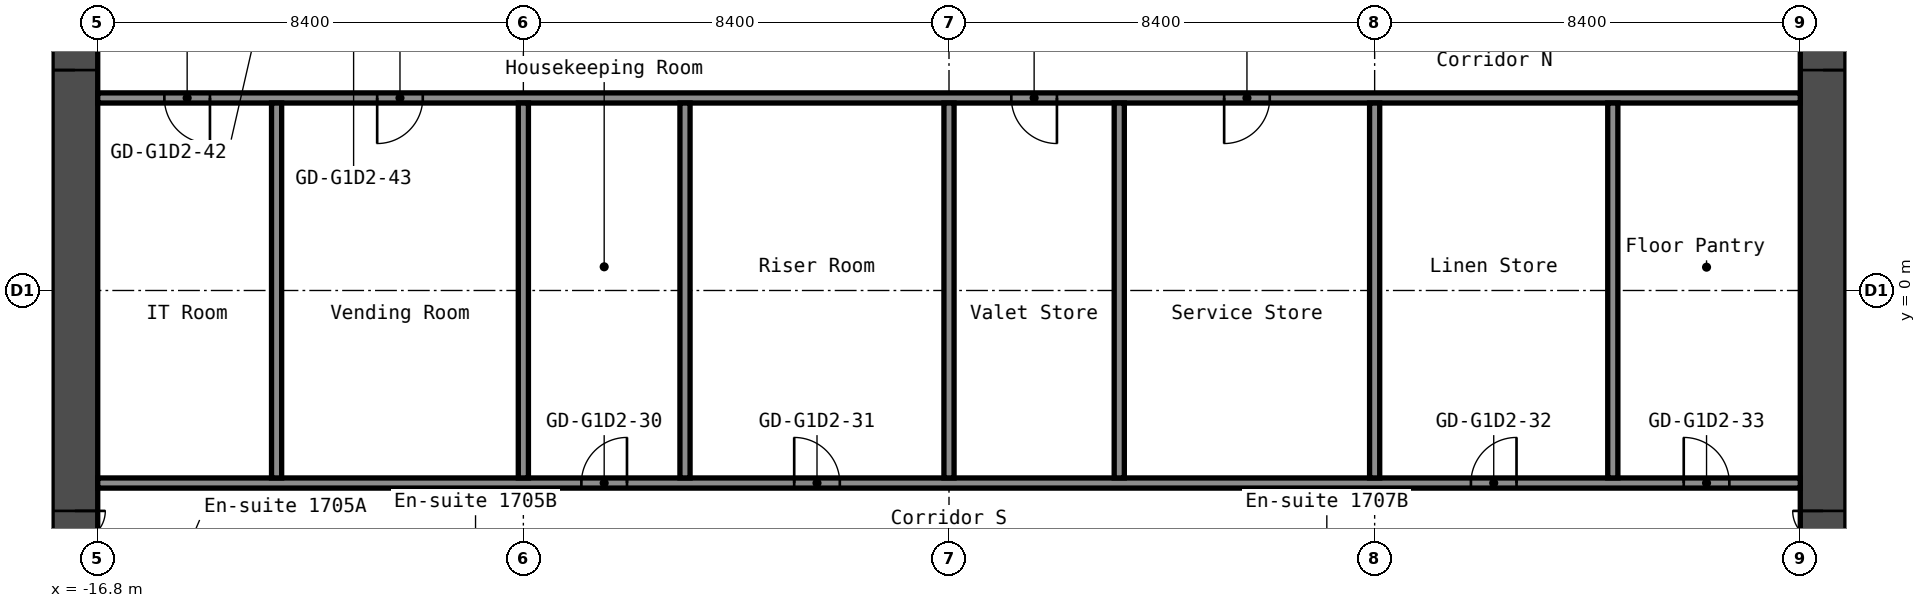
"""IFC4 building model, lengths in metres.
Left out: names, types, materials, properties, quantities, classifications, styles, units other than length and angle.
Written with IfcOpenShell. Run it as: python <this file> out.ifc"""

import sys

from ifc_helpers import new_model, si_unit, direction, frame, frame_2d, origin, place, context, subcontext, project, spatial, rectangle, extrude, element, fill, save


model = new_model("IFC4")
c1 = context("Model", 3, precision=1e-05, world=origin(), true_north=direction((0.0, 1.0)))
c2 = subcontext(c1, "Body", "Model", "MODEL_VIEW")
j1 = project(units=[si_unit("LENGTHUNIT", "METRE"), si_unit("PLANEANGLEUNIT", "RADIAN")], contexts=[c1])
p1 = place(None, origin())
s1 = spatial("IfcSite", under=j1, at=p1, CompositionType="ELEMENT")
p2 = place(p1, origin())
s2 = spatial("IfcBuilding", under=s1, at=p2, CompositionType="ELEMENT")
p3 = place(p2, frame((0.0, 0.0, 61.4)))
s3 = spatial("IfcBuildingStorey", under=s2, at=p3, CompositionType="ELEMENT", Elevation=61.4)
p4 = place(p3, frame((-17.25, -8.4, 0.0), z_axis=(0.0, 0.0, 1.0), x_axis=(0.0, 1.0, 0.0)))
e1 = element("IfcWall", 1, at=p4, inside=s3, PredefinedType="SHEAR", context=c2, shape_type="SweptSolid", body=[
    extrude(rectangle(XDim=16.8, YDim=0.9, at=frame_2d((8.4, 0.0))), origin(), (0.0, 0.0, 1.0), 2.9),
])
p5 = place(p4, frame((12.75, 0.0, 0.0)))
e2 = element("IfcOpeningElement", 2, at=p5, cuts=e1, PredefinedType="OPENING", context=c2, shape_type="SweptSolid", body=[
    extrude(rectangle(XDim=1.2, YDim=2.1, at=frame_2d((0.6, 1.05))), frame((0.0, 0.46, 0.0), z_axis=(0.0, -1.0, 0.0), x_axis=(1.0, 0.0, 0.0)), (0.0, 0.0, 1.0), 0.92),
])
p6 = place(p4, frame((2.85, 0.0, 0.0)))
e3 = element("IfcOpeningElement", 3, at=p6, cuts=e1, PredefinedType="OPENING", context=c2, shape_type="SweptSolid", body=[
    extrude(rectangle(XDim=1.2, YDim=2.1, at=frame_2d((0.6, 1.05))), frame((0.0, 0.46, 0.0), z_axis=(0.0, -1.0, 0.0), x_axis=(1.0, 0.0, 0.0)), (0.0, 0.0, 1.0), 0.92),
])
p7 = place(p3, frame((17.25, -8.4, 0.0), z_axis=(0.0, 0.0, 1.0), x_axis=(0.0, 1.0, 0.0)))
e4 = element("IfcWall", 4, at=p7, inside=s3, PredefinedType="SHEAR", context=c2, shape_type="SweptSolid", body=[
    extrude(rectangle(XDim=16.8, YDim=0.9, at=frame_2d((8.4, 0.0))), origin(), (0.0, 0.0, 1.0), 2.9),
])
p8 = place(p7, frame((12.75, 0.0, 0.0)))
e5 = element("IfcOpeningElement", 5, at=p8, cuts=e4, PredefinedType="OPENING", context=c2, shape_type="SweptSolid", body=[
    extrude(rectangle(XDim=1.2, YDim=2.1, at=frame_2d((0.6, 1.05))), frame((0.0, 0.46, 0.0), z_axis=(0.0, -1.0, 0.0), x_axis=(1.0, 0.0, 0.0)), (0.0, 0.0, 1.0), 0.92),
])
p9 = place(p7, frame((2.85, 0.0, 0.0)))
e6 = element("IfcOpeningElement", 6, at=p9, cuts=e4, PredefinedType="OPENING", context=c2, shape_type="SweptSolid", body=[
    extrude(rectangle(XDim=1.2, YDim=2.1, at=frame_2d((0.6, 1.05))), frame((0.0, 0.46, 0.0), z_axis=(0.0, -1.0, 0.0), x_axis=(1.0, 0.0, 0.0)), (0.0, 0.0, 1.0), 0.92),
])
p10 = place(p3, frame((-16.8, -3.8, 0.0), z_axis=(0.0, 0.0, 1.0), x_axis=(1.0, 0.0, 0.0)))
e7 = element("IfcWall", 7, at=p10, inside=s3, PredefinedType="PARTITIONING", context=c2, shape_type="SweptSolid", body=[
    extrude(rectangle(XDim=33.6, YDim=0.2, at=frame_2d((16.8, 0.0))), origin(), (0.0, 0.0, 1.0), 2.9),
])
p11 = place(p10, frame((9.545, 0.0, 0.0)))
e8 = element("IfcOpeningElement", 8, at=p11, cuts=e7, PredefinedType="OPENING", context=c2, shape_type="SweptSolid", body=[
    extrude(rectangle(XDim=0.9, YDim=2.1, at=frame_2d((0.45, 1.05))), frame((0.0, 0.11, 0.0), z_axis=(0.0, -1.0, 0.0), x_axis=(1.0, 0.0, 0.0)), (0.0, 0.0, 1.0), 0.22),
])
p12 = place(p10, frame((13.745, 0.0, 0.0)))
e9 = element("IfcOpeningElement", 9, at=p12, cuts=e7, PredefinedType="OPENING", context=c2, shape_type="SweptSolid", body=[
    extrude(rectangle(XDim=0.9, YDim=2.1, at=frame_2d((0.45, 1.05))), frame((0.0, 0.11, 0.0), z_axis=(0.0, -1.0, 0.0), x_axis=(1.0, 0.0, 0.0)), (0.0, 0.0, 1.0), 0.22),
])
p13 = place(p10, frame((27.1, 0.0, 0.0)))
e10 = element("IfcOpeningElement", 10, at=p13, cuts=e7, PredefinedType="OPENING", context=c2, shape_type="SweptSolid", body=[
    extrude(rectangle(XDim=0.9, YDim=2.1, at=frame_2d((0.45, 1.05))), frame((0.0, 0.11, 0.0), z_axis=(0.0, -1.0, 0.0), x_axis=(1.0, 0.0, 0.0)), (0.0, 0.0, 1.0), 0.22),
])
p14 = place(p10, frame((31.3, 0.0, 0.0)))
e11 = element("IfcOpeningElement", 11, at=p14, cuts=e7, PredefinedType="OPENING", context=c2, shape_type="SweptSolid", body=[
    extrude(rectangle(XDim=0.9, YDim=2.1, at=frame_2d((0.45, 1.05))), frame((0.0, 0.11, 0.0), z_axis=(0.0, -1.0, 0.0), x_axis=(1.0, 0.0, 0.0)), (0.0, 0.0, 1.0), 0.22),
])
p15 = place(p3, frame((-16.8, 3.8, 0.0), z_axis=(0.0, 0.0, 1.0), x_axis=(1.0, 0.0, 0.0)))
e12 = element("IfcWall", 12, at=p15, inside=s3, PredefinedType="PARTITIONING", context=c2, shape_type="SweptSolid", body=[
    extrude(rectangle(XDim=33.6, YDim=0.2, at=frame_2d((16.8, 0.0))), origin(), (0.0, 0.0, 1.0), 2.9),
])
p16 = place(p15, frame((1.315, 0.0, 0.0)))
e13 = element("IfcOpeningElement", 13, at=p16, cuts=e12, PredefinedType="OPENING", context=c2, shape_type="SweptSolid", body=[
    extrude(rectangle(XDim=0.9, YDim=2.1, at=frame_2d((0.45, 1.05))), frame((0.0, 0.11, 0.0), z_axis=(0.0, -1.0, 0.0), x_axis=(1.0, 0.0, 0.0)), (0.0, 0.0, 1.0), 0.22),
])
p17 = place(p15, frame((5.515, 0.0, 0.0)))
e14 = element("IfcOpeningElement", 14, at=p17, cuts=e12, PredefinedType="OPENING", context=c2, shape_type="SweptSolid", body=[
    extrude(rectangle(XDim=0.9, YDim=2.1, at=frame_2d((0.45, 1.05))), frame((0.0, 0.11, 0.0), z_axis=(0.0, -1.0, 0.0), x_axis=(1.0, 0.0, 0.0)), (0.0, 0.0, 1.0), 0.22),
])
p18 = place(p15, frame((18.03, 0.0, 0.0)))
e15 = element("IfcOpeningElement", 15, at=p18, cuts=e12, PredefinedType="OPENING", context=c2, shape_type="SweptSolid", body=[
    extrude(rectangle(XDim=0.9, YDim=2.1, at=frame_2d((0.45, 1.05))), frame((0.0, 0.11, 0.0), z_axis=(0.0, -1.0, 0.0), x_axis=(1.0, 0.0, 0.0)), (0.0, 0.0, 1.0), 0.22),
])
p19 = place(p15, frame((22.23, 0.0, 0.0)))
e16 = element("IfcOpeningElement", 16, at=p19, cuts=e12, PredefinedType="OPENING", context=c2, shape_type="SweptSolid", body=[
    extrude(rectangle(XDim=0.9, YDim=2.1, at=frame_2d((0.45, 1.05))), frame((0.0, 0.11, 0.0), z_axis=(0.0, -1.0, 0.0), x_axis=(1.0, 0.0, 0.0)), (0.0, 0.0, 1.0), 0.22),
])
for number, where, z_axis, x_axis in (
    (17, (-13.27, -3.7, 0.0), (0.0, 0.0, 1.0), (0.0, 1.0, 0.0)),
    (18, (-8.4, -3.7, 0.0), (0.0, 0.0, 1.0), (0.0, 1.0, 0.0)),
    (19, (-5.21, -3.7, 0.0), (0.0, 0.0, 1.0), (0.0, 1.0, 0.0)),
    (20, (0.0, -3.7, 0.0), (0.0, 0.0, 1.0), (0.0, 1.0, 0.0)),
    (21, (3.36, -3.7, 0.0), (0.0, 0.0, 1.0), (0.0, 1.0, 0.0)),
    (22, (8.4, -3.7, 0.0), (0.0, 0.0, 1.0), (0.0, 1.0, 0.0)),
    (23, (13.1, -3.7, 0.0), (0.0, 0.0, 1.0), (0.0, 1.0, 0.0)),
):
    element("IfcWall", number, at=place(p3, frame(where, z_axis=z_axis, x_axis=x_axis)), inside=s3, PredefinedType="PARTITIONING", context=c2, shape_type="SweptSolid", body=[
        extrude(rectangle(XDim=7.4, YDim=0.2, at=frame_2d((3.7, 0.0))), origin(), (0.0, 0.0, 1.0), 2.9),
    ])
p20 = place(p5, origin())
e24 = element("IfcDoor", 24, at=p20, inside=s3, OperationType="DOUBLE_DOOR_SINGLE_SWING", PredefinedType="DOOR", context=c2, shape_type="SweptSolid", body=[
    extrude(rectangle(XDim=1.2, YDim=2.1, at=frame_2d((0.6, 1.05))), frame((0.0, 0.025, 0.0), z_axis=(0.0, -1.0, 0.0), x_axis=(1.0, 0.0, 0.0)), (0.0, 0.0, 1.0), 0.05),
])
fill(e2, e24)
p21 = place(p6, origin())
e25 = element("IfcDoor", 25, at=p21, inside=s3, OperationType="DOUBLE_DOOR_SINGLE_SWING", PredefinedType="DOOR", context=c2, shape_type="SweptSolid", body=[
    extrude(rectangle(XDim=1.2, YDim=2.1, at=frame_2d((0.6, 1.05))), frame((0.0, 0.025, 0.0), z_axis=(0.0, -1.0, 0.0), x_axis=(1.0, 0.0, 0.0)), (0.0, 0.0, 1.0), 0.05),
])
fill(e3, e25)
p22 = place(p8, origin())
e26 = element("IfcDoor", 26, at=p22, inside=s3, OperationType="DOUBLE_DOOR_SINGLE_SWING", PredefinedType="DOOR", context=c2, shape_type="SweptSolid", body=[
    extrude(rectangle(XDim=1.2, YDim=2.1, at=frame_2d((0.6, 1.05))), frame((0.0, 0.025, 0.0), z_axis=(0.0, -1.0, 0.0), x_axis=(1.0, 0.0, 0.0)), (0.0, 0.0, 1.0), 0.05),
])
fill(e5, e26)
p23 = place(p9, origin())
e27 = element("IfcDoor", 27, at=p23, inside=s3, OperationType="DOUBLE_DOOR_SINGLE_SWING", PredefinedType="DOOR", context=c2, shape_type="SweptSolid", body=[
    extrude(rectangle(XDim=1.2, YDim=2.1, at=frame_2d((0.6, 1.05))), frame((0.0, 0.025, 0.0), z_axis=(0.0, -1.0, 0.0), x_axis=(1.0, 0.0, 0.0)), (0.0, 0.0, 1.0), 0.05),
])
fill(e6, e27)
p24 = place(p11, origin())
e28 = element("IfcDoor", 28, at=p24, inside=s3, OperationType="SINGLE_SWING_LEFT", PredefinedType="DOOR", context=c2, shape_type="SweptSolid", body=[
    extrude(rectangle(XDim=0.9, YDim=2.1, at=frame_2d((0.45, 1.05))), frame((0.0, 0.025, 0.0), z_axis=(0.0, -1.0, 0.0), x_axis=(1.0, 0.0, 0.0)), (0.0, 0.0, 1.0), 0.05),
])
fill(e8, e28)
p25 = place(p12, origin())
e29 = element("IfcDoor", 29, at=p25, inside=s3, OperationType="SINGLE_SWING_RIGHT", PredefinedType="DOOR", context=c2, shape_type="SweptSolid", body=[
    extrude(rectangle(XDim=0.9, YDim=2.1, at=frame_2d((0.45, 1.05))), frame((0.0, 0.025, 0.0), z_axis=(0.0, -1.0, 0.0), x_axis=(1.0, 0.0, 0.0)), (0.0, 0.0, 1.0), 0.05),
])
fill(e9, e29)
p26 = place(p13, origin())
e30 = element("IfcDoor", 30, at=p26, inside=s3, OperationType="SINGLE_SWING_LEFT", PredefinedType="DOOR", context=c2, shape_type="SweptSolid", body=[
    extrude(rectangle(XDim=0.9, YDim=2.1, at=frame_2d((0.45, 1.05))), frame((0.0, 0.025, 0.0), z_axis=(0.0, -1.0, 0.0), x_axis=(1.0, 0.0, 0.0)), (0.0, 0.0, 1.0), 0.05),
])
fill(e10, e30)
p27 = place(p14, origin())
e31 = element("IfcDoor", 31, at=p27, inside=s3, OperationType="SINGLE_SWING_RIGHT", PredefinedType="DOOR", context=c2, shape_type="SweptSolid", body=[
    extrude(rectangle(XDim=0.9, YDim=2.1, at=frame_2d((0.45, 1.05))), frame((0.0, 0.025, 0.0), z_axis=(0.0, -1.0, 0.0), x_axis=(1.0, 0.0, 0.0)), (0.0, 0.0, 1.0), 0.05),
])
fill(e11, e31)
p28 = place(p16, origin())
e32 = element("IfcDoor", 32, at=p28, inside=s3, OperationType="SINGLE_SWING_RIGHT", PredefinedType="DOOR", context=c2, shape_type="SweptSolid", body=[
    extrude(rectangle(XDim=0.9, YDim=2.1, at=frame_2d((0.45, 1.05))), frame((0.0, 0.025, 0.0), z_axis=(0.0, -1.0, 0.0), x_axis=(1.0, 0.0, 0.0)), (0.0, 0.0, 1.0), 0.05),
])
fill(e13, e32)
p29 = place(p17, origin())
e33 = element("IfcDoor", 33, at=p29, inside=s3, OperationType="SINGLE_SWING_LEFT", PredefinedType="DOOR", context=c2, shape_type="SweptSolid", body=[
    extrude(rectangle(XDim=0.9, YDim=2.1, at=frame_2d((0.45, 1.05))), frame((0.0, 0.025, 0.0), z_axis=(0.0, -1.0, 0.0), x_axis=(1.0, 0.0, 0.0)), (0.0, 0.0, 1.0), 0.05),
])
fill(e14, e33)
p30 = place(p18, origin())
e34 = element("IfcDoor", 34, at=p30, inside=s3, OperationType="SINGLE_SWING_RIGHT", PredefinedType="DOOR", context=c2, shape_type="SweptSolid", body=[
    extrude(rectangle(XDim=0.9, YDim=2.1, at=frame_2d((0.45, 1.05))), frame((0.0, 0.025, 0.0), z_axis=(0.0, -1.0, 0.0), x_axis=(1.0, 0.0, 0.0)), (0.0, 0.0, 1.0), 0.05),
])
fill(e15, e34)
p31 = place(p19, origin())
e35 = element("IfcDoor", 35, at=p31, inside=s3, OperationType="SINGLE_SWING_LEFT", PredefinedType="DOOR", context=c2, shape_type="SweptSolid", body=[
    extrude(rectangle(XDim=0.9, YDim=2.1, at=frame_2d((0.45, 1.05))), frame((0.0, 0.025, 0.0), z_axis=(0.0, -1.0, 0.0), x_axis=(1.0, 0.0, 0.0)), (0.0, 0.0, 1.0), 0.05),
])
fill(e16, e35)
save(model, sys.argv[1])
